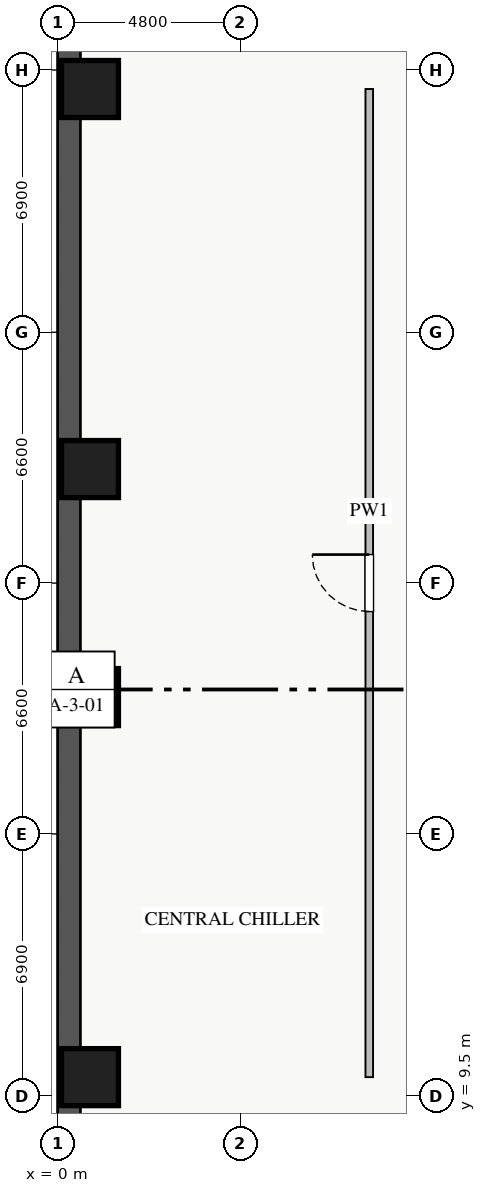
"""IFC4 building model, lengths in metres.
Left out: names, types, materials, properties, quantities, classifications, styles, units other than length and angle.
Written with IfcOpenShell. Run it as: python <this file> out.ifc"""

import sys

from ifc_helpers import new_model, si_unit, direction, frame, frame_2d, origin, origin_2d, place, context, subcontext, project, spatial, rectangle, extrude, source, transform, mapped, element, fill, save


model = new_model("IFC4")
c1 = context("Model", 3, precision=1e-05, world=origin(), true_north=direction((0.0, 1.0)))
c2 = subcontext(c1, "Body", "Model", "MODEL_VIEW")
j1 = project(units=[si_unit("LENGTHUNIT", "METRE"), si_unit("PLANEANGLEUNIT", "RADIAN")], contexts=[c1])
p1 = place(None, origin())
s1 = spatial("IfcSite", under=j1, at=p1, CompositionType="ELEMENT")
p2 = place(p1, origin())
s2 = spatial("IfcBuilding", under=s1, at=p2, CompositionType="ELEMENT")
p3 = place(p2, frame((0.0, 0.0, -9.6)))
s3 = spatial("IfcBuildingStorey", under=s2, at=p3, CompositionType="ELEMENT", Elevation=-9.6)
p4 = place(p3, frame((0.3, 0.6, 0.0), z_axis=(0.0, 0.0, 1.0), x_axis=(0.0, 1.0, 0.0)))
e1 = element("IfcWall", 1, at=p4, inside=s3, PredefinedType="SOLIDWALL", context=c2, shape_type="SweptSolid", body=[
    extrude(rectangle(XDim=44.8, YDim=0.6, at=frame_2d((22.4, 0.0))), origin(), (0.0, 0.0, 1.0), 4.8),
])
m1 = source(origin(), c2, "Body", "SweptSolid", [
    extrude(rectangle(XDim=1.5, YDim=1.5, at=origin_2d()), origin(), (0.0, 0.0, 1.0), 4.8),
])
for number, where, z_axis, x_axis in (
    (2, (0.85, 36.0, 0.0), (0.0, 0.0, 1.0), (1.0, 0.0, 0.0)),
    (3, (0.85, 26.0, 0.0), (0.0, 0.0, 1.0), (1.0, 0.0, 0.0)),
    (4, (0.85, 20.0, 0.0), (0.0, 0.0, 1.0), (1.0, 0.0, 0.0)),
    (5, (0.85, 10.0, 0.0), (0.0, 0.0, 1.0), (1.0, 0.0, 0.0)),
):
    element("IfcColumn", number, at=place(p3, frame(where, z_axis=z_axis, x_axis=x_axis)), inside=s3, PredefinedType="COLUMN", context=c2, shape_type="MappedRepresentation", body=[
        mapped(m1, transform((0.0, 0.0, 0.0), x_axis=(1.0, 0.0, 0.0), y_axis=(0.0, 1.0, 0.0), z_axis=(0.0, 0.0, 1.0), scale=1.0)),
    ])
p5 = place(p3, frame((8.2, 10.0, 0.0), z_axis=(0.0, 0.0, 1.0), x_axis=(0.0, 1.0, 0.0)))
e6 = element("IfcWall", 6, at=p5, inside=s3, PredefinedType="PARTITIONING", context=c2, shape_type="SweptSolid", body=[
    extrude(rectangle(XDim=26.0, YDim=0.2, at=frame_2d((13.0, 0.0))), origin(), (0.0, 0.0, 1.0), 4.58),
])
p6 = place(p5, frame((12.25, 0.0, 0.0)))
e7 = element("IfcOpeningElement", 7, at=p6, cuts=e6, PredefinedType="OPENING", context=c2, shape_type="SweptSolid", body=[
    extrude(rectangle(XDim=1.5, YDim=2.05, at=frame_2d((0.75, 1.025))), frame((0.0, 0.11, 0.0), z_axis=(0.0, -1.0, 0.0), x_axis=(1.0, 0.0, 0.0)), (0.0, 0.0, 1.0), 0.22),
])
m2 = source(origin(), c2, "Body", "SweptSolid", [
    extrude(rectangle(XDim=1.5, YDim=2.05, at=frame_2d((0.75, 1.025))), frame((0.0, 0.025, 0.0), z_axis=(0.0, -1.0, 0.0), x_axis=(1.0, 0.0, 0.0)), (0.0, 0.0, 1.0), 0.05),
])
p7 = place(p6, origin())
e8 = element("IfcDoor", 8, at=p7, inside=s3, OperationType="SINGLE_SWING_RIGHT", PredefinedType="DOOR", context=c2, shape_type="MappedRepresentation", body=[
    mapped(m2, transform((0.0, 0.0, 0.0), x_axis=(1.0, 0.0, 0.0), y_axis=(0.0, 1.0, 0.0), z_axis=(0.0, 0.0, 1.0), scale=1.0)),
])
fill(e7, e8)
save(model, sys.argv[1])
